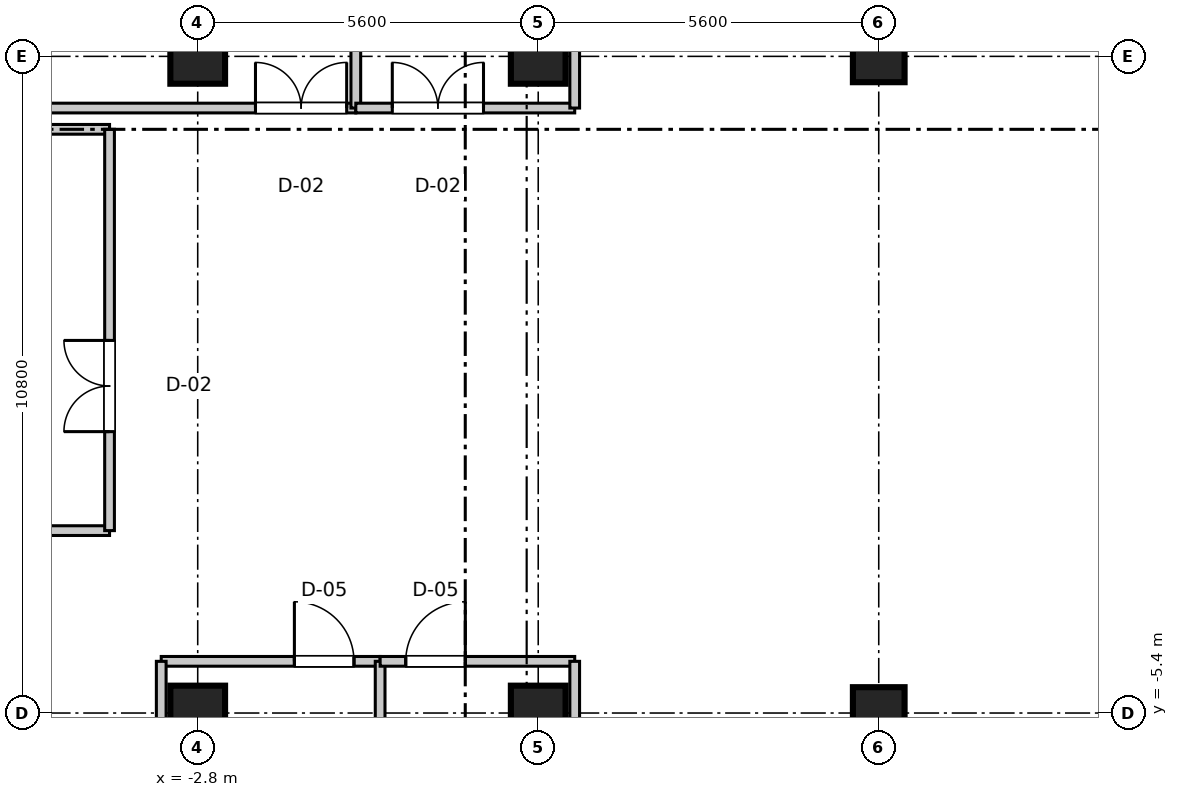
"""IFC4 building model, lengths in metres.
Left out: names, types, materials, properties, quantities, classifications, styles, units other than length and angle.
Written with IfcOpenShell. Run it as: python <this file> out.ifc"""

import sys

from ifc_helpers import new_model, si_unit, direction, frame, frame_2d, origin, origin_2d, place, context, subcontext, project, spatial, rectangle, extrude, source, transform, mapped, element, fill, save


model = new_model("IFC4")
c1 = context("Model", 3, precision=1e-05, world=origin(), true_north=direction((0.0, 1.0)))
c2 = subcontext(c1, "Body", "Model", "MODEL_VIEW")
j1 = project(units=[si_unit("LENGTHUNIT", "METRE"), si_unit("PLANEANGLEUNIT", "RADIAN")], contexts=[c1])
p1 = place(None, origin())
s1 = spatial("IfcSite", under=j1, at=p1, CompositionType="ELEMENT")
p2 = place(p1, origin())
s2 = spatial("IfcBuilding", under=s1, at=p2, CompositionType="ELEMENT")
p3 = place(p2, frame((0.0, 0.0, 352.05)))
s3 = spatial("IfcBuildingStorey", under=s2, at=p3, CompositionType="ELEMENT", Elevation=352.05)
m1 = source(origin(), c2, "Body", "SweptSolid", [
    extrude(rectangle(XDim=0.9, YDim=0.9, at=origin_2d()), origin(), (0.0, 0.0, 1.0), 4.955),
])
for number, where, z_axis, x_axis in (
    (1, (-2.8, -5.4, 0.0), (0.0, 0.0, 1.0), (1.0, 0.0, 0.0)),
    (2, (-2.8, 5.4, 0.0), (0.0, 0.0, 1.0), (1.0, 0.0, 0.0)),
    (3, (2.8, -5.4, 0.0), (0.0, 0.0, 1.0), (1.0, 0.0, 0.0)),
    (4, (2.8, 5.4, 0.0), (0.0, 0.0, 1.0), (1.0, 0.0, 0.0)),
):
    element("IfcColumn", number, at=place(p3, frame(where, z_axis=z_axis, x_axis=x_axis)), inside=s3, PredefinedType="COLUMN", context=c2, shape_type="MappedRepresentation", body=[
        mapped(m1, transform((0.0, 0.0, 0.0), scale=1.0)),
    ])
m2 = source(origin(), c2, "Body", "SweptSolid", [
    extrude(rectangle(XDim=0.85, YDim=0.85, at=origin_2d()), origin(), (0.0, 0.0, 1.0), 4.955),
])
for number, where, z_axis, x_axis in (
    (5, (8.4, -5.4, 0.0), (0.0, 0.0, 1.0), (1.0, 0.0, 0.0)),
    (6, (8.4, 5.4, 0.0), (0.0, 0.0, 1.0), (1.0, 0.0, 0.0)),
):
    element("IfcColumn", number, at=place(p3, frame(where, z_axis=z_axis, x_axis=x_axis)), inside=s3, PredefinedType="PILASTER", context=c2, shape_type="MappedRepresentation", body=[
        mapped(m2, transform((0.0, 0.0, 0.0), scale=1.0)),
    ])
m3 = source(origin(), c2, "Body", "SweptSolid", [
    extrude(rectangle(XDim=18.25, YDim=0.16, at=frame_2d((9.125, 0.0))), origin(), (0.0, 0.0, 1.0), 3.4),
])
for number, where, z_axis, x_axis in (
    (7, (-22.5, -2.4, 0.0), (0.0, 0.0, 1.0), (1.0, 0.0, 0.0)),
    (8, (-22.5, 4.2, 0.0), (0.0, 0.0, 1.0), (1.0, 0.0, 0.0)),
):
    element("IfcWall", number, at=place(p3, frame(where, z_axis=z_axis, x_axis=x_axis)), inside=s3, PredefinedType="PARTITIONING", context=c2, shape_type="MappedRepresentation", body=[
        mapped(m3, transform((0.0, 0.0, 0.0), scale=1.0)),
    ])
m4 = source(origin(), c2, "Body", "SweptSolid", [
    extrude(rectangle(XDim=6.6, YDim=0.16, at=frame_2d((3.3, 0.0))), origin(), (0.0, 0.0, 1.0), 3.4),
])
p4 = place(p3, frame((-4.25, -2.4, 0.0), z_axis=(0.0, 0.0, 1.0), x_axis=(0.0, 1.0, 0.0)))
e9 = element("IfcWall", 9, at=p4, inside=s3, PredefinedType="PARTITIONING", context=c2, shape_type="MappedRepresentation", body=[
    mapped(m4, transform((0.0, 0.0, 0.0), scale=1.0)),
])
p5 = place(p4, frame((1.628, 0.0, 0.0)))
e10 = element("IfcOpeningElement", 10, at=p5, cuts=e9, PredefinedType="OPENING", context=c2, shape_type="SweptSolid", body=[
    extrude(rectangle(XDim=1.5, YDim=2.15, at=frame_2d((0.75, 1.075))), frame((0.0, 0.09, 0.0), z_axis=(0.0, -1.0, 0.0), x_axis=(1.0, 0.0, 0.0)), (0.0, 0.0, 1.0), 0.18),
])
m5 = source(origin(), c2, "Body", "SweptSolid", [
    extrude(rectangle(XDim=22.3, YDim=0.16, at=frame_2d((11.15, 0.0))), origin(), (0.0, 0.0, 1.0), 3.4),
])
p6 = place(p3, frame((-22.5, 4.55, 0.0), z_axis=(0.0, 0.0, 1.0), x_axis=(1.0, 0.0, 0.0)))
e11 = element("IfcWall", 11, at=p6, inside=s3, PredefinedType="PARTITIONING", context=c2, shape_type="MappedRepresentation", body=[
    mapped(m5, transform((0.0, 0.0, 0.0), scale=1.0)),
])
p7 = place(p6, frame((20.65, 0.0, 0.0)))
e12 = element("IfcOpeningElement", 12, at=p7, cuts=e11, PredefinedType="OPENING", context=c2, shape_type="SweptSolid", body=[
    extrude(rectangle(XDim=1.5, YDim=2.15, at=frame_2d((0.75, 1.075))), frame((0.0, 0.09, 0.0), z_axis=(0.0, -1.0, 0.0), x_axis=(1.0, 0.0, 0.0)), (0.0, 0.0, 1.0), 0.18),
])
m6 = source(origin(), c2, "Body", "SweptSolid", [
    extrude(rectangle(XDim=17.95, YDim=0.16, at=frame_2d((8.975, 0.0))), origin(), (0.0, 0.0, 1.0), 3.4),
])
p8 = place(p3, frame((-0.2, 4.55, 0.0), z_axis=(0.0, 0.0, 1.0), x_axis=(0.0, 1.0, 0.0)))
e13 = element("IfcWall", 13, at=p8, inside=s3, PredefinedType="PARTITIONING", context=c2, shape_type="MappedRepresentation", body=[
    mapped(m6, transform((0.0, 0.0, 0.0), scale=1.0)),
])
m7 = source(origin(), c2, "Body", "SweptSolid", [
    extrude(rectangle(XDim=3.6, YDim=0.16, at=frame_2d((1.8, 0.0))), origin(), (0.0, 0.0, 1.0), 3.4),
])
p9 = place(p3, frame((-0.2, 4.55, 0.0), z_axis=(0.0, 0.0, 1.0), x_axis=(1.0, 0.0, 0.0)))
e14 = element("IfcWall", 14, at=p9, inside=s3, PredefinedType="PARTITIONING", context=c2, shape_type="MappedRepresentation", body=[
    mapped(m7, transform((0.0, 0.0, 0.0), scale=1.0)),
])
p10 = place(p9, frame((0.6, 0.0, 0.0)))
e15 = element("IfcOpeningElement", 15, at=p10, cuts=e14, PredefinedType="OPENING", context=c2, shape_type="SweptSolid", body=[
    extrude(rectangle(XDim=1.5, YDim=2.15, at=frame_2d((0.75, 1.075))), frame((0.0, 0.09, 0.0), z_axis=(0.0, -1.0, 0.0), x_axis=(1.0, 0.0, 0.0)), (0.0, 0.0, 1.0), 0.18),
])
p11 = place(p3, frame((3.4, 4.55, 0.0), z_axis=(0.0, 0.0, 1.0), x_axis=(0.0, 1.0, 0.0)))
e16 = element("IfcWall", 16, at=p11, inside=s3, PredefinedType="PARTITIONING", context=c2, shape_type="MappedRepresentation", body=[
    mapped(m6, transform((0.0, 0.0, 0.0), scale=1.0)),
])
p12 = place(p3, frame((-3.4, -4.55, 0.0), z_axis=(0.0, 0.0, 1.0), x_axis=(1.0, 0.0, 0.0)))
e17 = element("IfcWall", 17, at=p12, inside=s3, PredefinedType="PARTITIONING", context=c2, shape_type="MappedRepresentation", body=[
    mapped(m7, transform((0.0, 0.0, 0.0), scale=1.0)),
])
p13 = place(p12, frame((2.19, 0.0, 0.0)))
e18 = element("IfcOpeningElement", 18, at=p13, cuts=e17, PredefinedType="OPENING", context=c2, shape_type="SweptSolid", body=[
    extrude(rectangle(XDim=0.98, YDim=2.1, at=frame_2d((0.49, 1.05))), frame((0.0, 0.09, 0.0), z_axis=(0.0, -1.0, 0.0), x_axis=(1.0, 0.0, 0.0)), (0.0, 0.0, 1.0), 0.18),
])
m8 = source(origin(), c2, "Body", "SweptSolid", [
    extrude(rectangle(XDim=7.45, YDim=0.16, at=frame_2d((3.725, 0.0))), origin(), (0.0, 0.0, 1.0), 3.4),
])
for number, where, z_axis, x_axis in (
    (19, (-3.4, -12.0, 0.0), (0.0, 0.0, 1.0), (0.0, 1.0, 0.0)),
    (20, (0.2, -12.0, 0.0), (0.0, 0.0, 1.0), (0.0, 1.0, 0.0)),
):
    element("IfcWall", number, at=place(p3, frame(where, z_axis=z_axis, x_axis=x_axis)), inside=s3, PredefinedType="PARTITIONING", context=c2, shape_type="MappedRepresentation", body=[
        mapped(m8, transform((0.0, 0.0, 0.0), scale=1.0)),
    ])
m9 = source(origin(), c2, "Body", "SweptSolid", [
    extrude(rectangle(XDim=3.2, YDim=0.16, at=frame_2d((1.6, 0.0))), origin(), (0.0, 0.0, 1.0), 3.4),
])
p14 = place(p3, frame((0.2, -4.55, 0.0), z_axis=(0.0, 0.0, 1.0), x_axis=(1.0, 0.0, 0.0)))
e21 = element("IfcWall", 21, at=p14, inside=s3, PredefinedType="PARTITIONING", context=c2, shape_type="MappedRepresentation", body=[
    mapped(m9, transform((0.0, 0.0, 0.0), scale=1.0)),
])
p15 = place(p14, frame((0.421, 0.0, 0.0)))
e22 = element("IfcOpeningElement", 22, at=p15, cuts=e21, PredefinedType="OPENING", context=c2, shape_type="SweptSolid", body=[
    extrude(rectangle(XDim=0.98, YDim=2.1, at=frame_2d((0.49, 1.05))), frame((0.0, 0.09, 0.0), z_axis=(0.0, -1.0, 0.0), x_axis=(1.0, 0.0, 0.0)), (0.0, 0.0, 1.0), 0.18),
])
m10 = source(origin(), c2, "Body", "SweptSolid", [
    extrude(rectangle(XDim=6.45, YDim=0.16, at=frame_2d((3.225, 0.0))), origin(), (0.0, 0.0, 1.0), 3.4),
])
p16 = place(p3, frame((3.4, -11.0, 0.0), z_axis=(0.0, 0.0, 1.0), x_axis=(0.0, 1.0, 0.0)))
e23 = element("IfcWall", 23, at=p16, inside=s3, PredefinedType="PARTITIONING", context=c2, shape_type="MappedRepresentation", body=[
    mapped(m10, transform((0.0, 0.0, 0.0), scale=1.0)),
])
m11 = source(origin(), c2, "Body", "SweptSolid", [
    extrude(rectangle(XDim=1.5, YDim=2.15, at=frame_2d((0.75, 1.075))), frame((0.0, 0.025, 0.0), z_axis=(0.0, -1.0, 0.0), x_axis=(1.0, 0.0, 0.0)), (0.0, 0.0, 1.0), 0.05),
])
p17 = place(p5, origin())
e24 = element("IfcDoor", 24, at=p17, inside=s3, OperationType="DOUBLE_DOOR_SINGLE_SWING", PredefinedType="DOOR", context=c2, shape_type="MappedRepresentation", body=[
    mapped(m11, transform((0.0, 0.0, 0.0), scale=1.0)),
])
fill(e10, e24)
p18 = place(p7, origin())
e25 = element("IfcDoor", 25, at=p18, inside=s3, OperationType="DOUBLE_DOOR_SINGLE_SWING", PredefinedType="DOOR", context=c2, shape_type="MappedRepresentation", body=[
    mapped(m11, transform((0.0, 0.0, 0.0), scale=1.0)),
])
fill(e12, e25)
p19 = place(p10, origin())
e26 = element("IfcDoor", 26, at=p19, inside=s3, OperationType="DOUBLE_DOOR_SINGLE_SWING", PredefinedType="DOOR", context=c2, shape_type="MappedRepresentation", body=[
    mapped(m11, transform((0.0, 0.0, 0.0), scale=1.0)),
])
fill(e15, e26)
m12 = source(origin(), c2, "Body", "SweptSolid", [
    extrude(rectangle(XDim=0.98, YDim=2.1, at=frame_2d((0.49, 1.05))), frame((0.0, 0.025, 0.0), z_axis=(0.0, -1.0, 0.0), x_axis=(1.0, 0.0, 0.0)), (0.0, 0.0, 1.0), 0.05),
])
p20 = place(p13, frame((0.98, 0.0, 0.0), z_axis=(0.0, 0.0, 1.0), x_axis=(-1.0, 0.0, 0.0)))
e27 = element("IfcDoor", 27, at=p20, inside=s3, OperationType="SINGLE_SWING_LEFT", PredefinedType="DOOR", context=c2, shape_type="MappedRepresentation", body=[
    mapped(m12, transform((0.0, 0.0, 0.0), scale=1.0)),
])
fill(e18, e27)
p21 = place(p15, frame((0.98, 0.0, 0.0), z_axis=(0.0, 0.0, 1.0), x_axis=(-1.0, 0.0, 0.0)))
e28 = element("IfcDoor", 28, at=p21, inside=s3, OperationType="SINGLE_SWING_RIGHT", PredefinedType="DOOR", context=c2, shape_type="MappedRepresentation", body=[
    mapped(m12, transform((0.0, 0.0, 0.0), scale=1.0)),
])
fill(e22, e28)
save(model, sys.argv[1])
